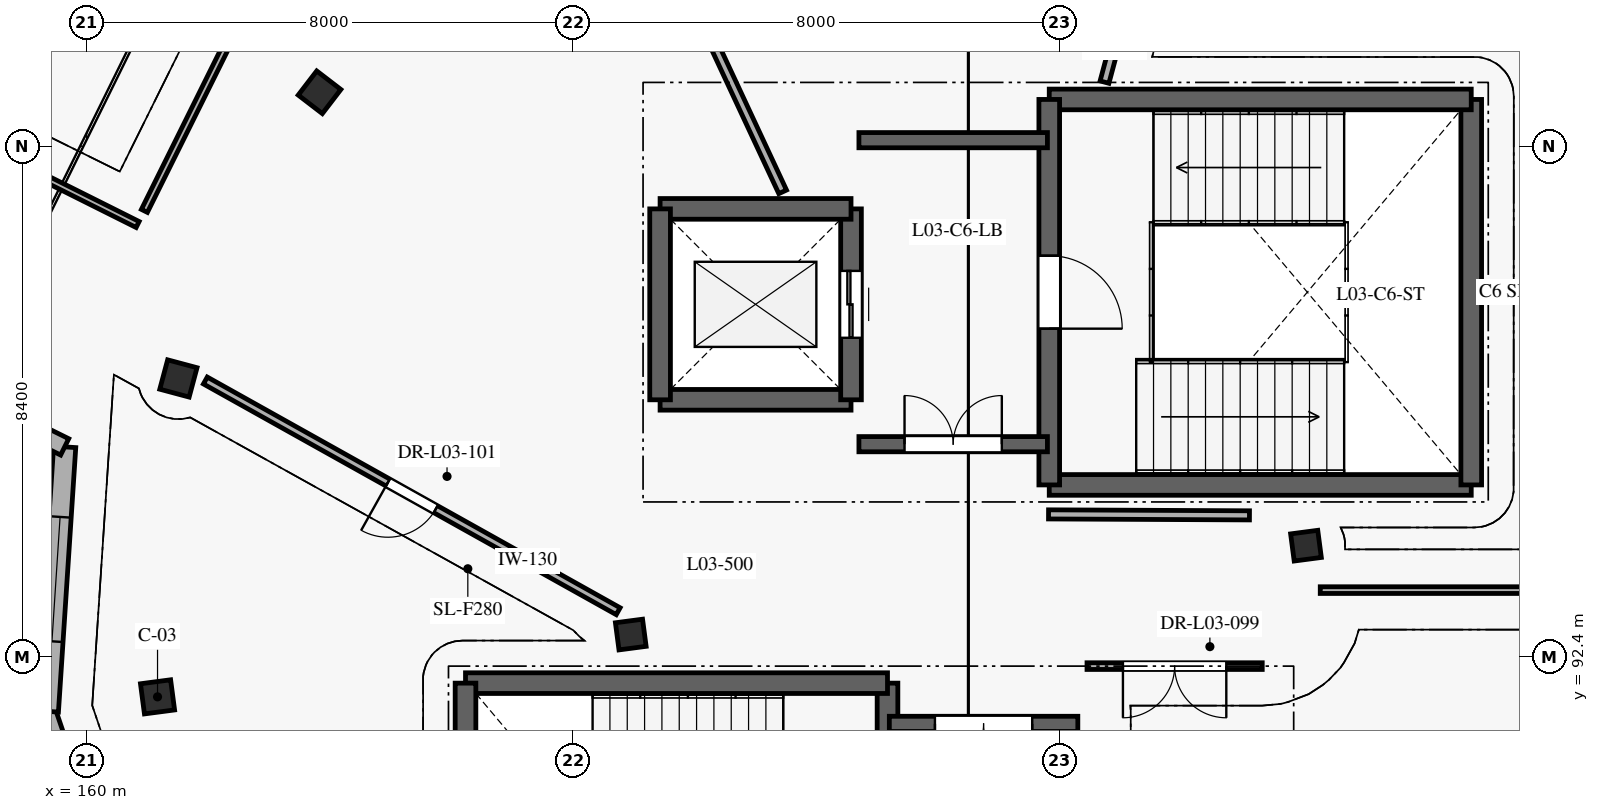
"""IFC4 building model, lengths in metres.
Left out: names, types, materials, properties, quantities, classifications, styles, units other than length and angle.
Written with IfcOpenShell. Run it as: python <this file> out.ifc"""

import sys

from ifc_helpers import new_model, si_unit, direction, frame, frame_2d, origin, origin_2d, place, context, subcontext, project, spatial, rectangle, extrude, element, fill, save


model = new_model("IFC4")
c1 = context("Model", 3, precision=1e-05, world=origin(), true_north=direction((0.0, 1.0)))
c2 = subcontext(c1, "Body", "Model", "MODEL_VIEW")
j1 = project(units=[si_unit("LENGTHUNIT", "METRE"), si_unit("PLANEANGLEUNIT", "RADIAN")], contexts=[c1])
p1 = place(None, origin())
s1 = spatial("IfcSite", under=j1, at=p1, CompositionType="ELEMENT")
p2 = place(p1, origin())
s2 = spatial("IfcBuilding", under=s1, at=p2, CompositionType="ELEMENT")
p3 = place(p2, frame((0.0, 0.0, 12.6)))
s3 = spatial("IfcBuildingStorey", under=s2, at=p3, CompositionType="ELEMENT", Elevation=12.6)
for number, where, z_axis, x_axis in (
    (1, (163.829, 101.688, 0.0), (0.0, 0.0, 1.0), (-0.609, -0.793, 0.0)),
    (2, (161.508, 96.981, 0.0), (0.0, 0.0, 1.0), (-0.259, -0.966, 0.0)),
    (3, (161.165, 91.744, 0.0), (0.0, 0.0, 1.0), (0.131, -0.991, 0.0)),
):
    element("IfcColumn", number, at=place(p3, frame(where, z_axis=z_axis, x_axis=x_axis)), inside=s3, PredefinedType="COLUMN", context=c2, shape_type="SweptSolid", body=[
        extrude(rectangle(XDim=0.5, YDim=0.5, at=origin_2d()), origin(), (0.0, 0.0, 1.0), 4.2),
    ])
for number, where, z_axis, x_axis in (
    (4, (180.052, 94.231, 0.0), (0.0, 0.0, 1.0), (0.991, 0.131, 0.0)),
    (5, (168.948, 92.769, 0.0), (0.0, 0.0, 1.0), (-0.991, -0.131, 0.0)),
):
    element("IfcColumn", number, at=place(p3, frame(where, z_axis=z_axis, x_axis=x_axis)), inside=s3, PredefinedType="COLUMN", context=c2, shape_type="SweptSolid", body=[
        extrude(rectangle(XDim=0.45, YDim=0.45, at=origin_2d()), origin(), (0.0, 0.0, 1.0), 4.2),
    ])
p4 = place(p3, frame((161.269, 85.861, 0.0), z_axis=(0.0, 0.0, 1.0), x_axis=(-0.321420298269, 0.94693663561, 0.0)))
e6 = element("IfcWall", 6, at=p4, inside=s3, PredefinedType="SOLIDWALL", context=c2, shape_type="SweptSolid", body=[
    extrude(rectangle(XDim=5.961, YDim=0.275, at=frame_2d((2.98, 0.0))), origin(), (0.0, 0.0, 1.0), 3.94),
])
p5 = place(p4, frame((0.615, 0.0, 0.85)))
e7 = element("IfcOpeningElement", 7, at=p5, cuts=e6, PredefinedType="OPENING", context=c2, shape_type="SweptSolid", body=[
    extrude(rectangle(XDim=1.75, YDim=1.8, at=frame_2d((0.875, 0.9))), frame((0.0, 0.147, 0.0), z_axis=(0.0, -1.0, 0.0), x_axis=(1.0, 0.0, 0.0)), (0.0, 0.0, 1.0), 0.295),
])
p6 = place(p4, frame((3.521, 0.0, 0.85)))
e8 = element("IfcOpeningElement", 8, at=p6, cuts=e6, PredefinedType="OPENING", context=c2, shape_type="SweptSolid", body=[
    extrude(rectangle(XDim=1.9, YDim=1.8, at=frame_2d((0.95, 0.9))), frame((0.0, 0.147, 0.0), z_axis=(0.0, -1.0, 0.0), x_axis=(1.0, 0.0, 0.0)), (0.0, 0.0, 1.0), 0.295),
])
p7 = place(p3, frame((159.353, 91.506, 0.0), z_axis=(0.0, 0.0, 1.0), x_axis=(0.06541495856, 0.997858147833, 0.0)))
e9 = element("IfcWall", 9, at=p7, inside=s3, PredefinedType="SOLIDWALL", context=c2, shape_type="SweptSolid", body=[
    extrude(rectangle(XDim=4.359, YDim=0.365, at=frame_2d((2.18, 0.0))), origin(), (0.0, 0.0, 1.0), 3.94),
])
p8 = place(p7, frame((1.155, 0.0, 0.85)))
e10 = element("IfcOpeningElement", 10, at=p8, cuts=e9, PredefinedType="OPENING", context=c2, shape_type="SweptSolid", body=[
    extrude(rectangle(XDim=2.05, YDim=1.8, at=frame_2d((1.025, 0.9))), frame((0.0, 0.192, 0.0), z_axis=(0.0, -1.0, 0.0), x_axis=(1.0, 0.0, 0.0)), (0.0, 0.0, 1.0), 0.385),
])
p9 = place(p3, frame((159.638, 95.856, 0.0), z_axis=(0.0, 0.0, 1.0), x_axis=(-0.896266612371, 0.443515681289, 0.0)))
e11 = element("IfcWall", 11, at=p9, inside=s3, PredefinedType="SOLIDWALL", context=c2, shape_type="SweptSolid", body=[
    extrude(rectangle(XDim=7.64, YDim=0.3, at=frame_2d((3.82, 0.0))), origin(), (0.0, 0.0, 1.0), 3.94),
])
p10 = place(p9, frame((0.81, 0.0, 0.85)))
e12 = element("IfcOpeningElement", 12, at=p10, cuts=e11, PredefinedType="OPENING", context=c2, shape_type="SweptSolid", body=[
    extrude(rectangle(XDim=2.2, YDim=1.8, at=frame_2d((1.1, 0.9))), frame((0.0, 0.16, 0.0), z_axis=(0.0, -1.0, 0.0), x_axis=(1.0, 0.0, 0.0)), (0.0, 0.0, 1.0), 0.32),
])
p11 = place(p9, frame((4.555, 0.0, 0.85)))
e13 = element("IfcOpeningElement", 13, at=p11, cuts=e11, PredefinedType="OPENING", context=c2, shape_type="SweptSolid", body=[
    extrude(rectangle(XDim=2.35, YDim=1.8, at=frame_2d((1.175, 0.9))), frame((0.0, 0.16, 0.0), z_axis=(0.0, -1.0, 0.0), x_axis=(1.0, 0.0, 0.0)), (0.0, 0.0, 1.0), 0.32),
])
p12 = place(p3, frame((173.17, 85.63, 0.0), z_axis=(0.0, 0.0, 1.0), x_axis=(0.0, 1.0, 0.0)))
e14 = element("IfcWall", 14, at=p12, inside=s3, PredefinedType="SHEAR", context=c2, shape_type="SweptSolid", body=[
    extrude(rectangle(XDim=6.34, YDim=0.34, at=frame_2d((3.17, 0.0))), origin(), (0.0, 0.0, 1.0), 3.95),
])
p13 = place(p12, frame((2.57, 0.0, 0.0)))
e15 = element("IfcOpeningElement", 15, at=p13, cuts=e14, PredefinedType="OPENING", context=c2, shape_type="SweptSolid", body=[
    extrude(rectangle(XDim=1.2, YDim=2.1, at=frame_2d((0.6, 1.05))), frame((0.0, 0.18, 0.0), z_axis=(0.0, -1.0, 0.0), x_axis=(1.0, 0.0, 0.0)), (0.0, 0.0, 1.0), 0.36),
])
p14 = place(p3, frame((173.17, 91.97, 0.0), z_axis=(0.0, 0.0, 1.0), x_axis=(-1.0, 0.0, 0.0)))
e16 = element("IfcWall", 16, at=p14, inside=s3, PredefinedType="SHEAR", context=c2, shape_type="SweptSolid", body=[
    extrude(rectangle(XDim=6.94, YDim=0.34, at=frame_2d((3.47, 0.0))), origin(), (0.0, 0.0, 1.0), 3.95),
])
p15 = place(p3, frame((166.23, 91.97, 0.0), z_axis=(0.0, 0.0, 1.0), x_axis=(0.0, -1.0, 0.0)))
e17 = element("IfcWall", 17, at=p15, inside=s3, PredefinedType="SHEAR", context=c2, shape_type="SweptSolid", body=[
    extrude(rectangle(XDim=6.34, YDim=0.34, at=frame_2d((3.17, 0.0))), origin(), (0.0, 0.0, 1.0), 3.95),
])
p16 = place(p3, frame((176.3, 91.3, 0.0), z_axis=(0.0, 0.0, 1.0), x_axis=(-1.0, 0.0, 0.0)))
e18 = element("IfcWall", 18, at=p16, inside=s3, PredefinedType="SHEAR", context=c2, shape_type="SweptSolid", body=[
    extrude(rectangle(XDim=3.1, YDim=0.25, at=frame_2d((1.55, 0.0))), origin(), (0.0, 0.0, 1.0), 3.95),
])
p17 = place(p16, frame((0.75, 0.0, 0.0)))
e19 = element("IfcOpeningElement", 19, at=p17, cuts=e18, PredefinedType="OPENING", context=c2, shape_type="SweptSolid", body=[
    extrude(rectangle(XDim=1.6, YDim=2.15, at=frame_2d((0.8, 1.075))), frame((0.0, 0.135, 0.0), z_axis=(0.0, -1.0, 0.0), x_axis=(1.0, 0.0, 0.0)), (0.0, 0.0, 1.0), 0.27),
])
p18 = place(p3, frame((175.83, 95.23, 0.0), z_axis=(0.0, 0.0, 1.0), x_axis=(1.0, 0.0, 0.0)))
e20 = element("IfcWall", 20, at=p18, inside=s3, PredefinedType="SHEAR", context=c2, shape_type="SweptSolid", body=[
    extrude(rectangle(XDim=6.94, YDim=0.34, at=frame_2d((3.47, 0.0))), origin(), (0.0, 0.0, 1.0), 3.95),
])
p19 = place(p3, frame((182.77, 95.23, 0.0), z_axis=(0.0, 0.0, 1.0), x_axis=(0.0, 1.0, 0.0)))
e21 = element("IfcWall", 21, at=p19, inside=s3, PredefinedType="SHEAR", context=c2, shape_type="SweptSolid", body=[
    extrude(rectangle(XDim=6.34, YDim=0.34, at=frame_2d((3.17, 0.0))), origin(), (0.0, 0.0, 1.0), 3.95),
])
p20 = place(p3, frame((182.77, 101.57, 0.0), z_axis=(0.0, 0.0, 1.0), x_axis=(-1.0, 0.0, 0.0)))
e22 = element("IfcWall", 22, at=p20, inside=s3, PredefinedType="SHEAR", context=c2, shape_type="SweptSolid", body=[
    extrude(rectangle(XDim=6.94, YDim=0.34, at=frame_2d((3.47, 0.0))), origin(), (0.0, 0.0, 1.0), 3.95),
])
p21 = place(p3, frame((175.83, 101.57, 0.0), z_axis=(0.0, 0.0, 1.0), x_axis=(0.0, -1.0, 0.0)))
e23 = element("IfcWall", 23, at=p21, inside=s3, PredefinedType="SHEAR", context=c2, shape_type="SweptSolid", body=[
    extrude(rectangle(XDim=6.34, YDim=0.34, at=frame_2d((3.17, 0.0))), origin(), (0.0, 0.0, 1.0), 3.95),
])
p22 = place(p21, frame((2.57, 0.0, 0.0)))
e24 = element("IfcOpeningElement", 24, at=p22, cuts=e23, PredefinedType="OPENING", context=c2, shape_type="SweptSolid", body=[
    extrude(rectangle(XDim=1.2, YDim=2.1, at=frame_2d((0.6, 1.05))), frame((0.0, 0.18, 0.0), z_axis=(0.0, -1.0, 0.0), x_axis=(1.0, 0.0, 0.0)), (0.0, 0.0, 1.0), 0.36),
])
p23 = place(p3, frame((169.43, 96.63, 0.0), z_axis=(0.0, 0.0, 1.0), x_axis=(1.0, 0.0, 0.0)))
e25 = element("IfcWall", 25, at=p23, inside=s3, PredefinedType="SHEAR", context=c2, shape_type="SweptSolid", body=[
    extrude(rectangle(XDim=3.14, YDim=0.34, at=frame_2d((1.57, 0.0))), origin(), (0.0, 0.0, 1.0), 3.95),
])
p24 = place(p3, frame((172.57, 96.63, 0.0), z_axis=(0.0, 0.0, 1.0), x_axis=(0.0, 1.0, 0.0)))
e26 = element("IfcWall", 26, at=p24, inside=s3, PredefinedType="SHEAR", context=c2, shape_type="SweptSolid", body=[
    extrude(rectangle(XDim=3.14, YDim=0.34, at=frame_2d((1.57, 0.0))), origin(), (0.0, 0.0, 1.0), 3.95),
])
p25 = place(p24, frame((1.02, 0.0, 0.0)))
e27 = element("IfcOpeningElement", 27, at=p25, cuts=e26, PredefinedType="OPENING", context=c2, shape_type="SweptSolid", body=[
    extrude(rectangle(XDim=1.1, YDim=2.1, at=frame_2d((0.55, 1.05))), frame((0.0, 0.18, 0.0), z_axis=(0.0, -1.0, 0.0), x_axis=(1.0, 0.0, 0.0)), (0.0, 0.0, 1.0), 0.36),
])
for number, where, z_axis, x_axis in (
    (28, (172.57, 99.77, 0.0), (0.0, 0.0, 1.0), (-1.0, 0.0, 0.0)),
    (29, (169.43, 99.77, 0.0), (0.0, 0.0, 1.0), (0.0, -1.0, 0.0)),
):
    element("IfcWall", number, at=place(p3, frame(where, z_axis=z_axis, x_axis=x_axis)), inside=s3, PredefinedType="SHEAR", context=c2, shape_type="SweptSolid", body=[
        extrude(rectangle(XDim=3.14, YDim=0.34, at=frame_2d((1.57, 0.0))), origin(), (0.0, 0.0, 1.0), 3.95),
    ])
p26 = place(p3, frame((172.7, 95.9, 0.0), z_axis=(0.0, 0.0, 1.0), x_axis=(1.0, 0.0, 0.0)))
e30 = element("IfcWall", 30, at=p26, inside=s3, PredefinedType="SHEAR", context=c2, shape_type="SweptSolid", body=[
    extrude(rectangle(XDim=3.1, YDim=0.25, at=frame_2d((1.55, 0.0))), origin(), (0.0, 0.0, 1.0), 3.95),
])
p27 = place(p26, frame((0.75, 0.0, 0.0)))
e31 = element("IfcOpeningElement", 31, at=p27, cuts=e30, PredefinedType="OPENING", context=c2, shape_type="SweptSolid", body=[
    extrude(rectangle(XDim=1.6, YDim=2.15, at=frame_2d((0.8, 1.075))), frame((0.0, 0.135, 0.0), z_axis=(0.0, -1.0, 0.0), x_axis=(1.0, 0.0, 0.0)), (0.0, 0.0, 1.0), 0.27),
])
p28 = place(p3, frame((175.8, 100.9, 0.0), z_axis=(0.0, 0.0, 1.0), x_axis=(-1.0, 0.0, 0.0)))
e32 = element("IfcWall", 32, at=p28, inside=s3, PredefinedType="SHEAR", context=c2, shape_type="SweptSolid", body=[
    extrude(rectangle(XDim=3.1, YDim=0.25, at=frame_2d((1.55, 0.0))), origin(), (0.0, 0.0, 1.0), 3.95),
])
p29 = place(p3, frame((179.333, 92.25, 0.0), z_axis=(0.0, 0.0, 1.0), x_axis=(-1.0, 0.0, 0.0)))
e33 = element("IfcWall", 33, at=p29, inside=s3, PredefinedType="PARTITIONING", context=c2, shape_type="SweptSolid", body=[
    extrude(rectangle(XDim=2.881, YDim=0.11, at=frame_2d((1.44, 0.0))), origin(), (0.0, 0.0, 1.0), 3.915),
])
p30 = place(p29, frame((0.591, 0.0, 0.0)))
e34 = element("IfcOpeningElement", 34, at=p30, cuts=e33, PredefinedType="OPENING", context=c2, shape_type="SweptSolid", body=[
    extrude(rectangle(XDim=1.7, YDim=2.18, at=frame_2d((0.85, 1.09))), frame((0.0, 0.065, 0.0), z_axis=(0.0, -1.0, 0.0), x_axis=(1.0, 0.0, 0.0)), (0.0, 0.0, 1.0), 0.13),
])
p31 = place(p3, frame((189.341, 93.5, 0.0), z_axis=(0.0, 0.0, 1.0), x_axis=(-1.0, 0.0, 0.0)))
e35 = element("IfcWall", 35, at=p31, inside=s3, PredefinedType="PARTITIONING", context=c2, shape_type="SweptSolid", body=[
    extrude(rectangle(XDim=9.054, YDim=0.11, at=frame_2d((4.527, 0.0))), origin(), (0.0, 0.0, 1.0), 3.915),
])
p32 = place(p3, frame((177.877, 106.102, 0.0), z_axis=(0.0, 0.0, 1.0), x_axis=(-0.25879251633, -0.965932934262, 0.0)))
e36 = element("IfcWall", 36, at=p32, inside=s3, PredefinedType="PARTITIONING", context=c2, shape_type="SweptSolid", body=[
    extrude(rectangle(XDim=4.397, YDim=0.15, at=frame_2d((2.199, 0.0))), origin(), (0.0, 0.0, 1.0), 3.915),
])
p33 = place(p32, frame((1.348, 0.0, 0.0)))
e37 = element("IfcOpeningElement", 37, at=p33, cuts=e36, PredefinedType="OPENING", context=c2, shape_type="SweptSolid", body=[
    extrude(rectangle(XDim=1.7, YDim=2.18, at=frame_2d((0.85, 1.09))), frame((0.0, 0.085, 0.0), z_axis=(0.0, -1.0, 0.0), x_axis=(1.0, 0.0, 0.0)), (0.0, 0.0, 1.0), 0.17),
])
p34 = place(p3, frame((175.818, 94.745, 0.0), z_axis=(0.0, 0.0, 1.0), x_axis=(0.999988467144, -0.004802663689, 0.0)))
e38 = element("IfcWall", 38, at=p34, inside=s3, PredefinedType="PARTITIONING", context=c2, shape_type="SweptSolid", body=[
    extrude(rectangle(XDim=3.304, YDim=0.15, at=frame_2d((1.652, 0.0))), origin(), (0.0, 0.0, 1.0), 3.915),
])
p35 = place(p3, frame((168.741, 93.153, 0.0), z_axis=(0.0, 0.0, 1.0), x_axis=(-0.8729210717, 0.48786145839, 0.0)))
e39 = element("IfcWall", 39, at=p35, inside=s3, PredefinedType="PARTITIONING", context=c2, shape_type="SweptSolid", body=[
    extrude(rectangle(XDim=7.778, YDim=0.13, at=frame_2d((3.889, 0.0))), origin(), (0.0, 0.0, 1.0), 3.562),
])
p36 = place(p35, frame((3.439, 0.0, 0.0)))
e40 = element("IfcOpeningElement", 40, at=p36, cuts=e39, PredefinedType="OPENING", context=c2, shape_type="SweptSolid", body=[
    extrude(rectangle(XDim=0.9, YDim=2.05, at=frame_2d((0.45, 1.025))), frame((0.0, 0.075, 0.0), z_axis=(0.0, -1.0, 0.0), x_axis=(1.0, 0.0, 0.0)), (0.0, 0.0, 1.0), 0.15),
])
p37 = place(p3, frame((168.221, 106.966, 0.0), z_axis=(0.0, 0.0, 1.0), x_axis=(0.422627966587, -0.906303261529, 0.0)))
e41 = element("IfcWall", 41, at=p37, inside=s3, PredefinedType="PLUMBINGWALL", context=c2, shape_type="SweptSolid", body=[
    extrude(rectangle(XDim=7.63, YDim=0.14, at=frame_2d((3.815, 0.0))), origin(), (0.0, 0.0, 1.0), 3.915),
])
p38 = place(p37, frame((3.305, 0.0, 0.0)))
e42 = element("IfcOpeningElement", 42, at=p38, cuts=e41, PredefinedType="OPENING", context=c2, shape_type="SweptSolid", body=[
    extrude(rectangle(XDim=1.02, YDim=2.06, at=frame_2d((0.51, 1.03))), frame((0.0, 0.08, 0.0), z_axis=(0.0, -1.0, 0.0), x_axis=(1.0, 0.0, 0.0)), (0.0, 0.0, 1.0), 0.16),
])
p39 = place(p3, frame((126.419, 116.733, 0.0), z_axis=(0.0, 0.0, 1.0), x_axis=(0.894319323199, -0.447429266088, 0.0)))
e43 = element("IfcWall", 43, at=p39, inside=s3, PredefinedType="PARTITIONING", context=c2, shape_type="SweptSolid", body=[
    extrude(rectangle(XDim=38.486, YDim=0.11, at=frame_2d((19.243, 0.0))), origin(), (0.0, 0.0, 1.0), 3.95),
])
p40 = place(p39, frame((18.743, 0.0, 0.0)))
e44 = element("IfcOpeningElement", 44, at=p40, cuts=e43, PredefinedType="OPENING", context=c2, shape_type="SweptSolid", body=[
    extrude(rectangle(XDim=1.0, YDim=2.1, at=frame_2d((0.5, 1.05))), frame((0.0, 0.065, 0.0), z_axis=(0.0, -1.0, 0.0), x_axis=(1.0, 0.0, 0.0)), (0.0, 0.0, 1.0), 0.13),
])
p41 = place(p3, frame((160.949, 99.737, 0.0), z_axis=(0.0, 0.0, 1.0), x_axis=(0.444424699134, 0.895816212624, 0.0)))
e45 = element("IfcWall", 45, at=p41, inside=s3, PredefinedType="PARTITIONING", context=c2, shape_type="SweptSolid", body=[
    extrude(rectangle(XDim=3.364, YDim=0.11, at=frame_2d((1.682, 0.0))), origin(), (0.0, 0.0, 1.0), 3.95),
])
p42 = place(p8, origin())
e46 = element("IfcWindow", 46, at=p42, inside=s3, PartitioningType="SINGLE_PANEL", PredefinedType="WINDOW", context=c2, shape_type="SweptSolid", body=[
    extrude(rectangle(XDim=2.05, YDim=1.8, at=frame_2d((1.025, 0.9))), frame((0.0, 0.03, 0.0), z_axis=(0.0, -1.0, 0.0), x_axis=(1.0, 0.0, 0.0)), (0.0, 0.0, 1.0), 0.06),
])
fill(e10, e46)
p43 = place(p17, origin())
e47 = element("IfcDoor", 47, at=p43, inside=s3, OperationType="DOUBLE_DOOR_SINGLE_SWING", PredefinedType="DOOR", context=c2, shape_type="SweptSolid", body=[
    extrude(rectangle(XDim=1.6, YDim=2.15, at=frame_2d((0.8, 1.075))), frame((0.0, 0.025, 0.0), z_axis=(0.0, -1.0, 0.0), x_axis=(1.0, 0.0, 0.0)), (0.0, 0.0, 1.0), 0.05),
])
fill(e19, e47)
p44 = place(p22, origin())
e48 = element("IfcDoor", 48, at=p44, inside=s3, OperationType="SINGLE_SWING_RIGHT", PredefinedType="DOOR", context=c2, shape_type="SweptSolid", body=[
    extrude(rectangle(XDim=1.2, YDim=2.1, at=frame_2d((0.6, 1.05))), frame((0.0, 0.025, 0.0), z_axis=(0.0, -1.0, 0.0), x_axis=(1.0, 0.0, 0.0)), (0.0, 0.0, 1.0), 0.05),
])
fill(e24, e48)
p45 = place(p25, frame((1.1, 0.0, 0.0), z_axis=(0.0, 0.0, 1.0), x_axis=(-1.0, 0.0, 0.0)))
e49 = element("IfcDoor", 49, at=p45, inside=s3, OperationType="DOUBLE_DOOR_SLIDING", PredefinedType="DOOR", context=c2, shape_type="SweptSolid", body=[
    extrude(rectangle(XDim=1.1, YDim=2.1, at=frame_2d((0.55, 1.05))), frame((0.0, 0.025, 0.0), z_axis=(0.0, -1.0, 0.0), x_axis=(1.0, 0.0, 0.0)), (0.0, 0.0, 1.0), 0.05),
])
fill(e27, e49)
p46 = place(p27, origin())
e50 = element("IfcDoor", 50, at=p46, inside=s3, OperationType="DOUBLE_DOOR_SINGLE_SWING", PredefinedType="DOOR", context=c2, shape_type="SweptSolid", body=[
    extrude(rectangle(XDim=1.6, YDim=2.15, at=frame_2d((0.8, 1.075))), frame((0.0, 0.025, 0.0), z_axis=(0.0, -1.0, 0.0), x_axis=(1.0, 0.0, 0.0)), (0.0, 0.0, 1.0), 0.05),
])
fill(e31, e50)
p47 = place(p30, origin())
e51 = element("IfcDoor", 51, at=p47, inside=s3, OperationType="DOUBLE_DOOR_SINGLE_SWING", PredefinedType="DOOR", context=c2, shape_type="SweptSolid", body=[
    extrude(rectangle(XDim=1.7, YDim=2.18, at=frame_2d((0.85, 1.09))), frame((0.0, 0.025, 0.0), z_axis=(0.0, -1.0, 0.0), x_axis=(1.0, 0.0, 0.0)), (0.0, 0.0, 1.0), 0.05),
])
fill(e34, e51)
p48 = place(p36, origin())
e52 = element("IfcDoor", 52, at=p48, inside=s3, OperationType="SINGLE_SWING_RIGHT", PredefinedType="DOOR", context=c2, shape_type="SweptSolid", body=[
    extrude(rectangle(XDim=0.9, YDim=2.05, at=frame_2d((0.45, 1.025))), frame((0.0, 0.025, 0.0), z_axis=(0.0, -1.0, 0.0), x_axis=(1.0, 0.0, 0.0)), (0.0, 0.0, 1.0), 0.05),
])
fill(e40, e52)
save(model, sys.argv[1])
